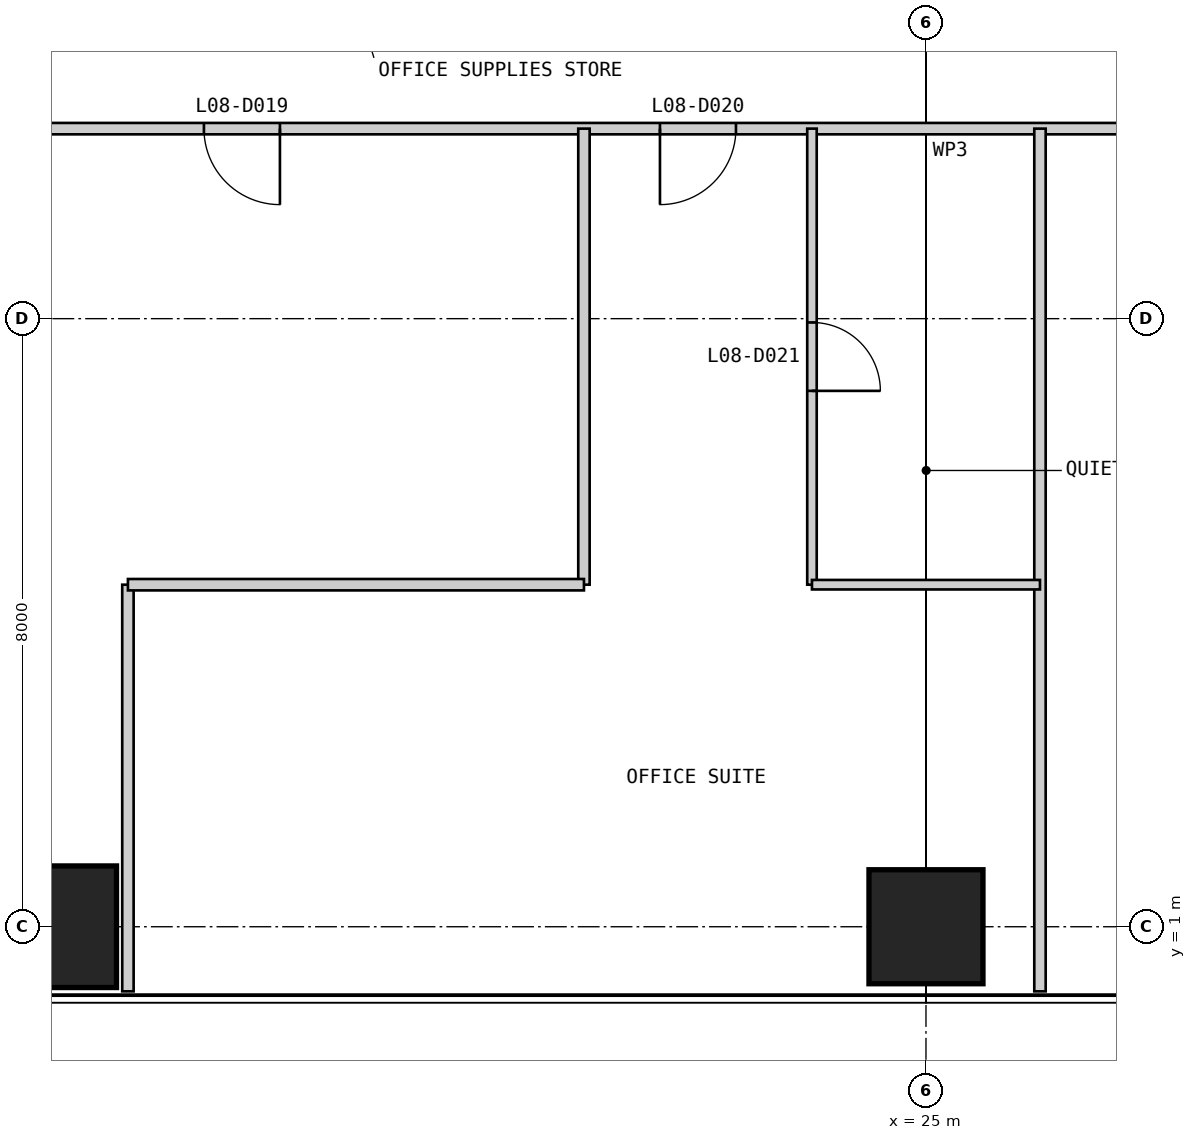
"""IFC4 building model, lengths in metres.
Left out: names, types, materials, properties, quantities, classifications, styles, units other than length and angle.
Written with IfcOpenShell. Run it as: python <this file> out.ifc"""

import sys

from ifc_helpers import new_model, si_unit, direction, frame, frame_2d, origin, origin_2d, place, context, subcontext, project, spatial, rectangle, extrude, element, fill, save


model = new_model("IFC4")
c1 = context("Model", 3, precision=1e-05, world=origin(), true_north=direction((0.0, 1.0)))
c2 = subcontext(c1, "Body", "Model", "MODEL_VIEW")
j1 = project(units=[si_unit("LENGTHUNIT", "METRE"), si_unit("PLANEANGLEUNIT", "RADIAN")], contexts=[c1])
p1 = place(None, origin())
s1 = spatial("IfcSite", under=j1, at=p1, CompositionType="ELEMENT")
p2 = place(p1, origin())
s2 = spatial("IfcBuilding", under=s1, at=p2, CompositionType="ELEMENT")
p3 = place(p2, frame((0.0, 0.0, 39.0)))
s3 = spatial("IfcBuildingStorey", under=s2, at=p3, CompositionType="ELEMENT", Elevation=39.0)
p4 = place(p3, frame((13.0, 1.0, 0.0), z_axis=(0.0, 0.0, 1.0), x_axis=(1.0, 0.0, 0.0)))
e1 = element("IfcColumn", 1, at=p4, inside=s3, PredefinedType="COLUMN", context=c2, shape_type="SweptSolid", body=[
    extrude(rectangle(XDim=2.7, YDim=1.6, at=origin_2d()), origin(), (0.0, 0.0, 1.0), 4.0),
])
p5 = place(p3, frame((25.0, 1.0, 0.0), z_axis=(0.0, 0.0, 1.0), x_axis=(1.0, 0.0, 0.0)))
e2 = element("IfcColumn", 2, at=p5, inside=s3, PredefinedType="COLUMN", context=c2, shape_type="SweptSolid", body=[
    extrude(rectangle(XDim=1.5, YDim=1.5, at=origin_2d()), origin(), (0.0, 0.0, 1.0), 4.0),
])
p6 = place(p3, frame((11.5, 11.5, 0.0), z_axis=(0.0, 0.0, 1.0), x_axis=(1.0, 0.0, 0.0)))
e3 = element("IfcWall", 3, at=p6, inside=s3, PredefinedType="PARTITIONING", context=c2, shape_type="SweptSolid", body=[
    extrude(rectangle(XDim=27.0, YDim=0.15, at=frame_2d((13.5, 0.0))), origin(), (0.0, 0.0, 1.0), 3.85),
])
p7 = place(p6, frame((4.0, 0.0, 0.0)))
e4 = element("IfcOpeningElement", 4, at=p7, cuts=e3, PredefinedType="OPENING", context=c2, shape_type="SweptSolid", body=[
    extrude(rectangle(XDim=1.0, YDim=2.2, at=frame_2d((0.5, 1.1))), frame((0.0, 0.085, 0.0), z_axis=(0.0, -1.0, 0.0), x_axis=(1.0, 0.0, 0.0)), (0.0, 0.0, 1.0), 0.17),
])
p8 = place(p6, frame((10.0, 0.0, 0.0)))
e5 = element("IfcOpeningElement", 5, at=p8, cuts=e3, PredefinedType="OPENING", context=c2, shape_type="SweptSolid", body=[
    extrude(rectangle(XDim=1.0, YDim=2.2, at=frame_2d((0.5, 1.1))), frame((0.0, 0.085, 0.0), z_axis=(0.0, -1.0, 0.0), x_axis=(1.0, 0.0, 0.0)), (0.0, 0.0, 1.0), 0.17),
])
p9 = place(p6, frame((17.5, 0.0, 0.0)))
e6 = element("IfcOpeningElement", 6, at=p9, cuts=e3, PredefinedType="OPENING", context=c2, shape_type="SweptSolid", body=[
    extrude(rectangle(XDim=1.0, YDim=2.2, at=frame_2d((0.5, 1.1))), frame((0.0, 0.085, 0.0), z_axis=(0.0, -1.0, 0.0), x_axis=(1.0, 0.0, 0.0)), (0.0, 0.0, 1.0), 0.17),
])
p10 = place(p6, frame((23.5, 0.0, 0.0)))
e7 = element("IfcOpeningElement", 7, at=p10, cuts=e3, PredefinedType="OPENING", context=c2, shape_type="SweptSolid", body=[
    extrude(rectangle(XDim=1.0, YDim=2.2, at=frame_2d((0.5, 1.1))), frame((0.0, 0.085, 0.0), z_axis=(0.0, -1.0, 0.0), x_axis=(1.0, 0.0, 0.0)), (0.0, 0.0, 1.0), 0.17),
])
p11 = place(p3, frame((14.5, 0.15, 0.0), z_axis=(0.0, 0.0, 1.0), x_axis=(0.0, 1.0, 0.0)))
e8 = element("IfcWall", 8, at=p11, inside=s3, PredefinedType="PARTITIONING", context=c2, shape_type="SweptSolid", body=[
    extrude(rectangle(XDim=5.35, YDim=0.15, at=frame_2d((2.675, 0.0))), origin(), (0.0, 0.0, 1.0), 3.85),
])
p12 = place(p3, frame((20.5, 5.5, 0.0), z_axis=(0.0, 0.0, 1.0), x_axis=(0.0, 1.0, 0.0)))
e9 = element("IfcWall", 9, at=p12, inside=s3, PredefinedType="PARTITIONING", context=c2, shape_type="SweptSolid", body=[
    extrude(rectangle(XDim=6.0, YDim=0.15, at=frame_2d((3.0, 0.0))), origin(), (0.0, 0.0, 1.0), 3.85),
])
p13 = place(p3, frame((23.5, 5.5, 0.0), z_axis=(0.0, 0.0, 1.0), x_axis=(0.0, 1.0, 0.0)))
e10 = element("IfcWall", 10, at=p13, inside=s3, PredefinedType="PARTITIONING", context=c2, shape_type="SweptSolid", body=[
    extrude(rectangle(XDim=6.0, YDim=0.125, at=frame_2d((3.0, 0.0))), origin(), (0.0, 0.0, 1.0), 3.85),
])
p14 = place(p13, frame((2.55, 0.0, 0.0)))
e11 = element("IfcOpeningElement", 11, at=p14, cuts=e10, PredefinedType="OPENING", context=c2, shape_type="SweptSolid", body=[
    extrude(rectangle(XDim=0.9, YDim=2.2, at=frame_2d((0.45, 1.1))), frame((0.0, 0.073, 0.0), z_axis=(0.0, -1.0, 0.0), x_axis=(1.0, 0.0, 0.0)), (0.0, 0.0, 1.0), 0.145),
])
p15 = place(p3, frame((26.5, 0.15, 0.0), z_axis=(0.0, 0.0, 1.0), x_axis=(0.0, 1.0, 0.0)))
e12 = element("IfcWall", 12, at=p15, inside=s3, PredefinedType="PARTITIONING", context=c2, shape_type="SweptSolid", body=[
    extrude(rectangle(XDim=11.35, YDim=0.15, at=frame_2d((5.675, 0.0))), origin(), (0.0, 0.0, 1.0), 3.85),
])
p16 = place(p3, frame((14.5, 5.5, 0.0), z_axis=(0.0, 0.0, 1.0), x_axis=(1.0, 0.0, 0.0)))
e13 = element("IfcWall", 13, at=p16, inside=s3, PredefinedType="PARTITIONING", context=c2, shape_type="SweptSolid", body=[
    extrude(rectangle(XDim=6.0, YDim=0.15, at=frame_2d((3.0, 0.0))), origin(), (0.0, 0.0, 1.0), 3.85),
])
p17 = place(p3, frame((23.5, 5.5, 0.0), z_axis=(0.0, 0.0, 1.0), x_axis=(1.0, 0.0, 0.0)))
e14 = element("IfcWall", 14, at=p17, inside=s3, PredefinedType="PARTITIONING", context=c2, shape_type="SweptSolid", body=[
    extrude(rectangle(XDim=3.0, YDim=0.125, at=frame_2d((1.5, 0.0))), origin(), (0.0, 0.0, 1.0), 3.85),
])
p18 = place(p7, frame((1.0, 0.0, 0.0), z_axis=(0.0, 0.0, 1.0), x_axis=(-1.0, 0.0, 0.0)))
e15 = element("IfcDoor", 15, at=p18, inside=s3, OperationType="SINGLE_SWING_LEFT", PredefinedType="DOOR", context=c2, shape_type="SweptSolid", body=[
    extrude(rectangle(XDim=1.0, YDim=2.2, at=frame_2d((0.5, 1.1))), frame((0.0, 0.025, 0.0), z_axis=(0.0, -1.0, 0.0), x_axis=(1.0, 0.0, 0.0)), (0.0, 0.0, 1.0), 0.05),
])
fill(e4, e15)
p19 = place(p8, frame((1.0, 0.0, 0.0), z_axis=(0.0, 0.0, 1.0), x_axis=(-1.0, 0.0, 0.0)))
e16 = element("IfcDoor", 16, at=p19, inside=s3, OperationType="SINGLE_SWING_RIGHT", PredefinedType="DOOR", context=c2, shape_type="SweptSolid", body=[
    extrude(rectangle(XDim=1.0, YDim=2.2, at=frame_2d((0.5, 1.1))), frame((0.0, 0.025, 0.0), z_axis=(0.0, -1.0, 0.0), x_axis=(1.0, 0.0, 0.0)), (0.0, 0.0, 1.0), 0.05),
])
fill(e5, e16)
p20 = place(p14, frame((0.9, 0.0, 0.0), z_axis=(0.0, 0.0, 1.0), x_axis=(-1.0, 0.0, 0.0)))
e17 = element("IfcDoor", 17, at=p20, inside=s3, OperationType="SINGLE_SWING_RIGHT", PredefinedType="DOOR", context=c2, shape_type="SweptSolid", body=[
    extrude(rectangle(XDim=0.9, YDim=2.2, at=frame_2d((0.45, 1.1))), frame((0.0, 0.025, 0.0), z_axis=(0.0, -1.0, 0.0), x_axis=(1.0, 0.0, 0.0)), (0.0, 0.0, 1.0), 0.05),
])
fill(e11, e17)
save(model, sys.argv[1])
